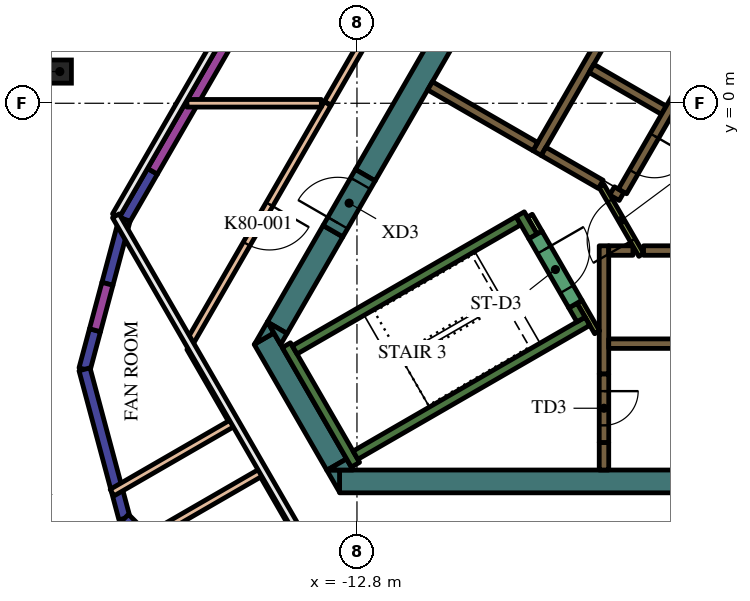
"""IFC4 building model, lengths in metres.
Left out: names, types, materials, properties, quantities, classifications, styles, units other than length and angle.
Written with IfcOpenShell. Run it as: python <this file> out.ifc"""

import sys

from ifc_helpers import new_model, si_unit, direction, frame, frame_2d, origin, origin_2d, place, context, subcontext, project, spatial, polyline, rectangle, hollow_circle, outline, extrude, element, fill, save


model = new_model("IFC4")
c1 = context("Model", 3, precision=1e-05, world=origin(), true_north=direction((0.0, 1.0)))
c2 = subcontext(c1, "Body", "Model", "MODEL_VIEW")
j1 = project(units=[si_unit("LENGTHUNIT", "METRE"), si_unit("PLANEANGLEUNIT", "RADIAN")], contexts=[c1])
p1 = place(None, origin())
s1 = spatial("IfcSite", under=j1, at=p1, CompositionType="ELEMENT")
p2 = place(p1, origin())
s2 = spatial("IfcBuilding", under=s1, at=p2, CompositionType="ELEMENT")
p3 = place(p2, frame((0.0, 0.0, 344.4)))
s3 = spatial("IfcBuildingStorey", under=s2, at=p3, CompositionType="ELEMENT", Elevation=344.4)
p4 = place(p3, frame((-20.619, 0.834, 0.0), z_axis=(0.0, 0.0, 1.0), x_axis=(1.0, 0.0, 0.0)))
e1 = element("IfcColumn", 1, at=p4, inside=s3, PredefinedType="COLUMN", context=c2, shape_type="SweptSolid", body=[
    extrude(hollow_circle(Radius=0.305, WallThickness=0.025, at=origin_2d()), origin(), (0.0, 0.0, 1.0), 4.2),
])
p5 = place(p3, frame((8.904, -9.95, 0.0), z_axis=(0.0, 0.0, 1.0), x_axis=(-1.0, 0.0, 0.0)))
e2 = element("IfcWall", 2, at=p5, inside=s3, PredefinedType="SOLIDWALL", context=c2, shape_type="SweptSolid", body=[
    extrude(rectangle(XDim=22.161, YDim=0.6, at=frame_2d((11.081, 0.0))), origin(), (0.0, 0.0, 1.0), 4.2),
])
p6 = place(p3, origin())
e3 = element("IfcWall", 3, at=p6, inside=s3, PredefinedType="SOLIDWALL", context=c2, shape_type="SweptSolid", body=[
    extrude(outline(polyline([(-13.597, -9.65), (-13.259, -9.65), (-13.259, -10.236), (-13.597, -9.65)])), origin(), (0.0, 0.0, 1.0), 4.2),
])
p7 = place(p3, frame((-13.333, -9.506, 0.0), z_axis=(0.0, 0.0, 1.0), x_axis=(-0.500019073792, 0.866014391245, 0.0)))
e4 = element("IfcWall", 4, at=p7, inside=s3, PredefinedType="SOLIDWALL", context=c2, shape_type="SweptSolid", body=[
    extrude(rectangle(XDim=3.823, YDim=0.6, at=frame_2d((1.912, 0.0))), origin(), (0.0, 0.0, 1.0), 4.2),
])
e5 = element("IfcWall", 5, at=p6, inside=s3, PredefinedType="SOLIDWALL", context=c2, shape_type="SweptSolid", body=[
    extrude(outline(polyline([(-14.987, -6.043), (-15.493, -6.335), (-15.156, -5.75), (-14.987, -6.043)])), origin(), (0.0, 0.0, 1.0), 4.2),
])
e6 = element("IfcWall", 6, at=p6, inside=s3, PredefinedType="SOLIDWALL", context=c2, shape_type="SweptSolid", body=[
    extrude(outline(polyline([(-12.904, -9.65), (-13.58, -9.65), (-13.073, -9.357), (-12.904, -9.65)])), origin(), (0.0, 0.0, 1.0), 4.2),
])
p8 = place(p3, frame((-13.432, -3.364, 0.0), z_axis=(0.0, 0.0, 1.0), x_axis=(-0.499960127962, -0.866048422692, 0.0)))
e7 = element("IfcWall", 7, at=p8, inside=s3, PredefinedType="SOLIDWALL", context=c2, shape_type="SweptSolid", body=[
    extrude(rectangle(XDim=2.934, YDim=0.6, at=frame_2d((1.467, 0.0))), origin(), (0.0, 0.0, 1.0), 4.2),
])
e8 = element("IfcWall", 8, at=p6, inside=s3, PredefinedType="SOLIDWALL", context=c2, shape_type="SweptSolid", body=[
    extrude(outline(polyline([(-14.809, -6.35), (-15.147, -5.764), (-14.64, -6.057), (-14.809, -6.35)])), origin(), (0.0, 0.0, 1.0), 4.2),
])
p9 = place(p3, frame((-4.652, 11.842, 0.0), z_axis=(0.0, 0.0, 1.0), x_axis=(-0.500003640647, -0.866023301845, 0.0)))
e9 = element("IfcWall", 9, at=p9, inside=s3, PredefinedType="SOLIDWALL", context=c2, shape_type="SweptSolid", body=[
    extrude(rectangle(XDim=15.858, YDim=0.6, at=frame_2d((7.929, 0.0))), origin(), (0.0, 0.0, 1.0), 4.2),
])
p10 = place(p3, frame((-12.84, -9.511, 0.0), z_axis=(0.0, 0.0, 1.0), x_axis=(-0.499997733992, 0.866026712061, 0.0)))
e10 = element("IfcWall", 10, at=p10, inside=s3, PredefinedType="SOLIDWALL", context=c2, shape_type="SweptSolid", body=[
    extrude(rectangle(XDim=3.634, YDim=0.25, at=frame_2d((1.817, 0.0))), origin(), (0.0, 0.0, 1.0), 4.2),
])
p11 = place(p3, frame((-14.44, -6.49, 0.0), z_axis=(0.0, 0.0, 1.0), x_axis=(0.866022966069, 0.500004222222, 0.0)))
e11 = element("IfcWall", 11, at=p11, inside=s3, PredefinedType="SOLIDWALL", context=c2, shape_type="SweptSolid", body=[
    extrude(rectangle(XDim=6.8, YDim=0.25, at=frame_2d((3.4, 0.0))), origin(), (0.0, 0.0, 1.0), 4.2),
])
p12 = place(p3, frame((-8.168, -3.503, 0.0), z_axis=(0.0, 0.0, 1.0), x_axis=(-0.499952099219, 0.866053057547, 0.0)))
e12 = element("IfcWall", 12, at=p12, inside=s3, PredefinedType="SOLIDWALL", context=c2, shape_type="SweptSolid", body=[
    extrude(rectangle(XDim=0.675, YDim=0.25, at=frame_2d((0.337, 0.0))), origin(), (0.0, 0.0, 1.0), 4.2),
])
p13 = place(p3, frame((-12.84, -9.261, 0.0), z_axis=(0.0, 0.0, 1.0), x_axis=(0.866016039709, 0.500016218704, 0.0)))
e13 = element("IfcWall", 13, at=p13, inside=s3, PredefinedType="SOLIDWALL", context=c2, shape_type="SweptSolid", body=[
    extrude(rectangle(XDim=7.05, YDim=0.25, at=frame_2d((3.525, 0.0))), origin(), (0.0, 0.0, 1.0), 4.2),
])
p14 = place(p3, frame((-6.905, -5.69, 0.0), z_axis=(0.0, 0.0, 1.0), x_axis=(-0.500402024738, 0.865793170242, 0.0)))
e14 = element("IfcWall", 14, at=p14, inside=s3, PredefinedType="SOLIDWALL", context=c2, shape_type="SweptSolid", body=[
    extrude(rectangle(XDim=0.425, YDim=0.25, at=frame_2d((0.212, 0.0))), origin(), (0.0, 0.0, 1.0), 4.2),
])
p15 = place(p3, frame((-5.259, -3.875, 0.0), z_axis=(0.0, 0.0, 1.0), x_axis=(1.0, 0.0, 0.0)))
e15 = element("IfcWall", 15, at=p15, inside=s3, PredefinedType="SOLIDWALL", context=c2, shape_type="SweptSolid", body=[
    extrude(rectangle(XDim=10.489, YDim=0.25, at=frame_2d((5.244, 0.0))), origin(), (0.0, 0.0, 1.0), 4.2),
])
p16 = place(p3, frame((-6.3, -7.125, 0.0), z_axis=(0.0, 0.0, 1.0), x_axis=(0.0, 1.0, 0.0)))
e16 = element("IfcWall", 16, at=p16, inside=s3, PredefinedType="SOLIDWALL", context=c2, shape_type="SweptSolid", body=[
    extrude(rectangle(XDim=3.375, YDim=0.25, at=frame_2d((1.687, 0.0))), origin(), (0.0, 0.0, 1.0), 4.2),
])
p17 = place(p3, frame((-6.175, -3.875, 0.0), z_axis=(0.0, 0.0, 1.0), x_axis=(1.0, 0.0, 0.0)))
e17 = element("IfcWall", 17, at=p17, inside=s3, PredefinedType="SOLIDWALL", context=c2, shape_type="SweptSolid", body=[
    extrude(rectangle(XDim=0.637, YDim=0.25, at=frame_2d((0.318, 0.0))), origin(), (0.0, 0.0, 1.0), 4.2),
])
p18 = place(p3, frame((-6.3, -8.925, 0.0), z_axis=(0.0, 0.0, 1.0), x_axis=(0.0, -1.0, 0.0)))
e18 = element("IfcWall", 18, at=p18, inside=s3, PredefinedType="SOLIDWALL", context=c2, shape_type="SweptSolid", body=[
    extrude(rectangle(XDim=0.725, YDim=0.25, at=frame_2d((0.363, 0.0))), origin(), (0.0, 0.0, 1.0), 4.2),
])
p19 = place(p3, frame((-8.06, -1.311, 0.0), z_axis=(0.0, 0.0, 1.0), x_axis=(0.50000273126, 0.866023826885, 0.0)))
e19 = element("IfcWall", 19, at=p19, inside=s3, PredefinedType="SOLIDWALL", context=c2, shape_type="SweptSolid", body=[
    extrude(rectangle(XDim=10.33, YDim=0.25, at=frame_2d((5.165, 0.0))), origin(), (0.0, 0.0, 1.0), 4.2),
])
p20 = place(p3, frame((-4.724, -0.182, 0.0), z_axis=(0.0, 0.0, 1.0), x_axis=(-0.866008176907, 0.50002983664, 0.0)))
e20 = element("IfcWall", 20, at=p20, inside=s3, PredefinedType="SOLIDWALL", context=c2, shape_type="SweptSolid", body=[
    extrude(rectangle(XDim=2.2, YDim=0.25, at=frame_2d((1.1, 0.0))), origin(), (0.0, 0.0, 1.0), 4.2),
])
p21 = place(p3, frame((-6.088, -2.305, 0.0), z_axis=(0.0, 0.0, 1.0), x_axis=(0.866059450854, -0.499941024108, 0.0)))
e21 = element("IfcWall", 21, at=p21, inside=s3, PredefinedType="SOLIDWALL", context=c2, shape_type="SweptSolid", body=[
    extrude(rectangle(XDim=0.29, YDim=0.25, at=frame_2d((0.145, 0.0))), origin(), (0.0, 0.0, 1.0), 4.2),
])
p22 = place(p3, frame((-7.889, -1.265, 0.0), z_axis=(0.0, 0.0, 1.0), x_axis=(0.865986741702, -0.500066958712, 0.0)))
e22 = element("IfcWall", 22, at=p22, inside=s3, PredefinedType="SOLIDWALL", context=c2, shape_type="SweptSolid", body=[
    extrude(rectangle(XDim=1.738, YDim=0.25, at=frame_2d((0.869, 0.0))), origin(), (0.0, 0.0, 1.0), 4.2),
])
p23 = place(p3, frame((-8.106, -1.14, 0.0), z_axis=(0.0, 0.0, 1.0), x_axis=(-0.866008981251, 0.500028443584, 0.0)))
e23 = element("IfcWall", 23, at=p23, inside=s3, PredefinedType="SOLIDWALL", context=c2, shape_type="SweptSolid", body=[
    extrude(rectangle(XDim=3.2, YDim=0.25, at=frame_2d((1.6, 0.0))), origin(), (0.0, 0.0, 1.0), 4.2),
])
p24 = place(p3, frame((-8.252, -2.958, 0.0), z_axis=(0.0, 0.0, 1.0), x_axis=(0.500174715838, -0.865924508047, 0.0)))
e24 = element("IfcWall", 24, at=p24, inside=s3, PredefinedType="PARTITIONING", context=c2, shape_type="SweptSolid", body=[
    extrude(rectangle(XDim=0.514, YDim=0.15, at=frame_2d((0.257, 0.0))), origin(), (0.0, 0.0, 1.0), 3.3),
])
p25 = place(p3, frame((-6.48, -6.027, 0.0), z_axis=(0.0, 0.0, 1.0), x_axis=(-0.499927229454, 0.866067413802, 0.0)))
e25 = element("IfcWall", 25, at=p25, inside=s3, PredefinedType="PARTITIONING", context=c2, shape_type="SweptSolid", body=[
    extrude(rectangle(XDim=0.929, YDim=0.15, at=frame_2d((0.464, 0.0))), origin(), (0.0, 0.0, 1.0), 4.2),
])
p26 = place(p3, frame((-6.175, -6.325, 0.0), z_axis=(0.0, 0.0, 1.0), x_axis=(1.0, 0.0, 0.0)))
e26 = element("IfcWall", 26, at=p26, inside=s3, PredefinedType="SOLIDWALL", context=c2, shape_type="SweptSolid", body=[
    extrude(rectangle(XDim=12.35, YDim=0.25, at=frame_2d((6.175, 0.0))), origin(), (0.0, 0.0, 1.0), 4.2),
])
p27 = place(p26, frame((3.205, 0.0, 0.0)))
e27 = element("IfcOpeningElement", 27, at=p27, cuts=e26, PredefinedType="OPENING", context=c2, shape_type="SweptSolid", body=[
    extrude(rectangle(XDim=0.9, YDim=2.1, at=frame_2d((0.45, 1.05))), frame((0.0, 0.135, 0.0), z_axis=(0.0, -1.0, 0.0), x_axis=(1.0, 0.0, 0.0)), (0.0, 0.0, 1.0), 0.27),
])
p28 = place(p26, frame((8.145, 0.0, 0.0)))
e28 = element("IfcOpeningElement", 28, at=p28, cuts=e26, PredefinedType="OPENING", context=c2, shape_type="SweptSolid", body=[
    extrude(rectangle(XDim=1.1, YDim=2.1, at=frame_2d((0.55, 1.05))), frame((0.0, 0.135, 0.0), z_axis=(0.0, -1.0, 0.0), x_axis=(1.0, 0.0, 0.0)), (0.0, 0.0, 1.0), 0.27),
])
p29 = place(p26, frame((10.665, 0.0, 0.0)))
e29 = element("IfcOpeningElement", 29, at=p29, cuts=e26, PredefinedType="OPENING", context=c2, shape_type="SweptSolid", body=[
    extrude(rectangle(XDim=1.1, YDim=2.1, at=frame_2d((0.55, 1.05))), frame((0.0, 0.135, 0.0), z_axis=(0.0, -1.0, 0.0), x_axis=(1.0, 0.0, 0.0)), (0.0, 0.0, 1.0), 0.27),
])
p30 = place(p3, frame((-0.898, 6.194, 0.0), z_axis=(0.0, 0.0, 1.0), x_axis=(-0.499996202215, -0.866027596426, 0.0)))
e30 = element("IfcWall", 30, at=p30, inside=s3, PredefinedType="SOLIDWALL", context=c2, shape_type="SweptSolid", body=[
    extrude(rectangle(XDim=9.83, YDim=0.25, at=frame_2d((4.915, 0.0))), origin(), (0.0, 0.0, 1.0), 4.2),
])
p31 = place(p30, frame((0.585, 0.0, 0.0)))
e31 = element("IfcOpeningElement", 31, at=p31, cuts=e30, PredefinedType="OPENING", context=c2, shape_type="SweptSolid", body=[
    extrude(rectangle(XDim=1.1, YDim=2.1, at=frame_2d((0.55, 1.05))), frame((0.0, 0.135, 0.0), z_axis=(0.0, -1.0, 0.0), x_axis=(1.0, 0.0, 0.0)), (0.0, 0.0, 1.0), 0.27),
])
p32 = place(p30, frame((3.105, 0.0, 0.0)))
e32 = element("IfcOpeningElement", 32, at=p32, cuts=e30, PredefinedType="OPENING", context=c2, shape_type="SweptSolid", body=[
    extrude(rectangle(XDim=1.1, YDim=2.1, at=frame_2d((0.55, 1.05))), frame((0.0, 0.135, 0.0), z_axis=(0.0, -1.0, 0.0), x_axis=(1.0, 0.0, 0.0)), (0.0, 0.0, 1.0), 0.27),
])
p33 = place(p30, frame((5.625, 0.0, 0.0)))
e33 = element("IfcOpeningElement", 33, at=p33, cuts=e30, PredefinedType="OPENING", context=c2, shape_type="SweptSolid", body=[
    extrude(rectangle(XDim=1.1, YDim=2.1, at=frame_2d((0.55, 1.05))), frame((0.0, 0.135, 0.0), z_axis=(0.0, -1.0, 0.0), x_axis=(1.0, 0.0, 0.0)), (0.0, 0.0, 1.0), 0.27),
])
p34 = place(p30, frame((8.145, 0.0, 0.0)))
e34 = element("IfcOpeningElement", 34, at=p34, cuts=e30, PredefinedType="OPENING", context=c2, shape_type="SweptSolid", body=[
    extrude(rectangle(XDim=1.1, YDim=2.1, at=frame_2d((0.55, 1.05))), frame((0.0, 0.135, 0.0), z_axis=(0.0, -1.0, 0.0), x_axis=(1.0, 0.0, 0.0)), (0.0, 0.0, 1.0), 0.27),
])
p35 = place(p3, frame((-8.103, -3.466, 0.0), z_axis=(0.0, 0.0, 1.0), x_axis=(0.500078061341, -0.865980330357, 0.0)))
e35 = element("IfcWall", 35, at=p35, inside=s3, PredefinedType="SOLIDWALL", context=c2, shape_type="SweptSolid", body=[
    extrude(rectangle(XDim=2.1, YDim=0.4, at=frame_2d((1.05, 0.0))), origin(), (0.0, 0.0, 1.0), 4.2),
])
p36 = place(p35, frame((0.45, 0.0, 0.0)))
e36 = element("IfcOpeningElement", 36, at=p36, cuts=e35, PredefinedType="OPENING", context=c2, shape_type="SweptSolid", body=[
    extrude(rectangle(XDim=1.2, YDim=2.1, at=frame_2d((0.6, 1.05))), frame((0.0, 0.21, 0.0), z_axis=(0.0, -1.0, 0.0), x_axis=(1.0, 0.0, 0.0)), (0.0, 0.0, 1.0), 0.42),
])
p37 = place(p3, frame((-6.3, -7.125, 0.0), z_axis=(0.0, 0.0, 1.0), x_axis=(0.0, -1.0, 0.0)))
e37 = element("IfcWall", 37, at=p37, inside=s3, PredefinedType="SOLIDWALL", context=c2, shape_type="SweptSolid", body=[
    extrude(rectangle(XDim=1.8, YDim=0.25, at=frame_2d((0.9, 0.0))), origin(), (0.0, 0.0, 1.0), 4.2),
])
p38 = place(p37, frame((0.45, 0.0, 0.0)))
e38 = element("IfcOpeningElement", 38, at=p38, cuts=e37, PredefinedType="OPENING", context=c2, shape_type="SweptSolid", body=[
    extrude(rectangle(XDim=0.9, YDim=2.1, at=frame_2d((0.45, 1.05))), frame((0.0, 0.135, 0.0), z_axis=(0.0, -1.0, 0.0), x_axis=(1.0, 0.0, 0.0)), (0.0, 0.0, 1.0), 0.27),
])
p39 = place(p3, frame((-5.317, -3.99, 0.0), z_axis=(0.0, 0.0, 1.0), x_axis=(-0.500027713859, 0.866009402589, 0.0)))
e39 = element("IfcWall", 39, at=p39, inside=s3, PredefinedType="PARTITIONING", context=c2, shape_type="SweptSolid", body=[
    extrude(rectangle(XDim=2.1, YDim=0.15, at=frame_2d((1.05, 0.0))), origin(), (0.0, 0.0, 1.0), 4.2),
])
p40 = place(p39, frame((0.45, 0.0, 0.0)))
e40 = element("IfcOpeningElement", 40, at=p40, cuts=e39, PredefinedType="OPENING", context=c2, shape_type="SweptSolid", body=[
    extrude(rectangle(XDim=1.2, YDim=2.1, at=frame_2d((0.6, 1.05))), frame((0.0, 0.085, 0.0), z_axis=(0.0, -1.0, 0.0), x_axis=(1.0, 0.0, 0.0)), (0.0, 0.0, 1.0), 0.17),
])
p41 = place(p3, frame((-13.432, -3.364, 0.0), z_axis=(0.0, 0.0, 1.0), x_axis=(0.500000056704, 0.866025371046, 0.0)))
e41 = element("IfcWall", 41, at=p41, inside=s3, PredefinedType="SOLIDWALL", context=c2, shape_type="SweptSolid", body=[
    extrude(rectangle(XDim=1.7, YDim=0.6, at=frame_2d((0.85, 0.0))), origin(), (0.0, 0.0, 1.0), 4.2),
])
p42 = place(p41, frame((0.25, 0.0, 0.0)))
e42 = element("IfcOpeningElement", 42, at=p42, cuts=e41, PredefinedType="OPENING", context=c2, shape_type="SweptSolid", body=[
    extrude(rectangle(XDim=1.2, YDim=2.1, at=frame_2d((0.6, 1.05))), frame((0.0, 0.31, 0.0), z_axis=(0.0, -1.0, 0.0), x_axis=(1.0, 0.0, 0.0)), (0.0, 0.0, 1.0), 0.62),
])
p43 = place(p3, frame((-3.118, 18.1, 0.0), z_axis=(0.0, 0.0, 1.0), x_axis=(-0.499998496574, -0.866026271786, 0.0)))
e43 = element("IfcWall", 43, at=p43, inside=s3, PredefinedType="PARTITIONING", context=c2, shape_type="SweptSolid", body=[
    extrude(rectangle(XDim=20.9, YDim=0.2, at=frame_2d((10.45, 0.0))), origin(), (0.0, 0.0, 1.0), 3.3),
])
p44 = place(p43, frame((9.65, 0.0, 0.0)))
e44 = element("IfcOpeningElement", 44, at=p44, cuts=e43, PredefinedType="OPENING", context=c2, shape_type="SweptSolid", body=[
    extrude(rectangle(XDim=1.6, YDim=2.1, at=frame_2d((0.8, 1.05))), frame((0.0, 0.11, 0.0), z_axis=(0.0, -1.0, 0.0), x_axis=(1.0, 0.0, 0.0)), (0.0, 0.0, 1.0), 0.22),
])
p45 = place(p3, frame((-13.573, -0.009, 0.0), z_axis=(0.0, 0.0, 1.0), x_axis=(-0.50000817069, -0.866020686383, 0.0)))
e45 = element("IfcWall", 45, at=p45, inside=s3, PredefinedType="PARTITIONING", context=c2, shape_type="SweptSolid", body=[
    extrude(rectangle(XDim=7.323, YDim=0.2, at=frame_2d((3.661, 0.0))), origin(), (0.0, 0.0, 1.0), 3.3),
])
p46 = place(p45, frame((3.061, 0.0, 0.0)))
e46 = element("IfcOpeningElement", 46, at=p46, cuts=e45, PredefinedType="OPENING", context=c2, shape_type="SweptSolid", body=[
    extrude(rectangle(XDim=1.2, YDim=2.1, at=frame_2d((0.6, 1.05))), frame((0.0, 0.11, 0.0), z_axis=(0.0, -1.0, 0.0), x_axis=(1.0, 0.0, 0.0)), (0.0, 0.0, 1.0), 0.22),
])
p47 = place(p3, frame((-17.274, 0.0, 0.0), z_axis=(0.0, 0.0, 1.0), x_axis=(1.0, 0.0, 0.0)))
e47 = element("IfcWall", 47, at=p47, inside=s3, PredefinedType="PARTITIONING", context=c2, shape_type="SweptSolid", body=[
    extrude(rectangle(XDim=3.536, YDim=0.2, at=frame_2d((1.768, 0.0))), origin(), (0.0, 0.0, 1.0), 3.3),
])
for number, where, z_axis, x_axis in (
    (48, (-19.244, -10.245, 0.0), (0.0, 0.0, 1.0), (0.866, 0.5, 0.0)),
    (49, (-15.3, -9.699, 0.0), (0.0, 0.0, 1.0), (-0.866, -0.5, 0.0)),
):
    element("IfcWall", number, at=place(p3, frame(where, z_axis=z_axis, x_axis=x_axis)), inside=s3, PredefinedType="PARTITIONING", context=c2, shape_type="SweptSolid", body=[
        extrude(rectangle(XDim=3.688, YDim=0.2, at=frame_2d((1.844, 0.0))), origin(), (0.0, 0.0, 1.0), 3.3),
    ])
for number, where, z_axis, x_axis in (
    (50, (-16.1, -8.314, 0.0), (0.0, 0.0, 1.0), (-0.5, 0.866, 0.0)),
    (51, (-14.161, -11.672, 0.0), (0.0, 0.0, 1.0), (-0.5, 0.866, 0.0)),
):
    element("IfcWall", number, at=place(p3, frame(where, z_axis=z_axis, x_axis=x_axis)), inside=s3, PredefinedType="PARTITIONING", context=c2, shape_type="SweptSolid", body=[
        extrude(rectangle(XDim=2.178, YDim=0.2, at=frame_2d((1.089, 0.0))), origin(), (0.0, 0.0, 1.0), 3.3),
    ])
p48 = place(p3, frame((-7.54, 16.64, 0.0), z_axis=(0.0, 0.0, 1.0), x_axis=(-0.500002158106, -0.866024157798, 0.0)))
e52 = element("IfcWall", 52, at=p48, inside=s3, PredefinedType="SOLIDWALL", context=c2, shape_type="SweptSolid", body=[
    extrude(rectangle(XDim=21.282, YDim=0.3, at=frame_2d((10.641, 0.0))), origin(), (0.0, 0.0, 1.0), 3.3),
])
p49 = place(p3, frame((-18.181, -1.79, 0.0), z_axis=(0.0, 0.0, 1.0), x_axis=(-0.500049712553, -0.865996700326, 0.0)))
e53 = element("IfcWall", 53, at=p49, inside=s3, PredefinedType="SOLIDWALL", context=c2, shape_type="SweptSolid", body=[
    extrude(rectangle(XDim=1.464, YDim=0.3, at=frame_2d((0.732, 0.0))), origin(), (0.0, 0.0, 1.0), 3.8),
])
p50 = place(p3, frame((-18.913, -3.058, 0.0), z_axis=(0.0, 0.0, 1.0), x_axis=(-0.258824282894, -0.965924422812, 0.0)))
e54 = element("IfcWall", 54, at=p50, inside=s3, PredefinedType="SOLIDWALL", context=c2, shape_type="SweptSolid", body=[
    extrude(rectangle(XDim=1.753, YDim=0.3, at=frame_2d((0.876, 0.0))), origin(), (0.0, 0.0, 1.0), 3.8),
])
p51 = place(p3, frame((-19.366, -4.751, 0.0), z_axis=(0.0, 0.0, 1.0), x_axis=(-0.258816538161, -0.965926498018, 0.0)))
e55 = element("IfcWall", 55, at=p51, inside=s3, PredefinedType="SOLIDWALL", context=c2, shape_type="SweptSolid", body=[
    extrude(rectangle(XDim=1.264, YDim=0.3, at=frame_2d((0.632, 0.0))), origin(), (0.0, 0.0, 1.0), 3.3),
])
p52 = place(p3, frame((-19.694, -5.972, 0.0), z_axis=(0.0, 0.0, 1.0), x_axis=(-0.258690231517, -0.96596033258, 0.0)))
e56 = element("IfcWall", 56, at=p52, inside=s3, PredefinedType="SOLIDWALL", context=c2, shape_type="SweptSolid", body=[
    extrude(rectangle(XDim=1.064, YDim=0.3, at=frame_2d((0.532, 0.0))), origin(), (0.0, 0.0, 1.0), 3.8),
])
for number, where, z_axis, x_axis in (
    (57, (-19.969, -7.0, 0.0), (0.0, 0.0, 1.0), (0.259, -0.966, 0.0)),
    (58, (-18.918, -10.922, 0.0), (0.0, 0.0, 1.0), (0.707, -0.707, 0.0)),
):
    element("IfcWall", number, at=place(p3, frame(where, z_axis=z_axis, x_axis=x_axis)), inside=s3, PredefinedType="SOLIDWALL", context=c2, shape_type="SweptSolid", body=[
        extrude(rectangle(XDim=4.061, YDim=0.3, at=frame_2d((2.03, 0.0))), origin(), (0.0, 0.0, 1.0), 3.8),
    ])
p53 = place(p34, origin())
e59 = element("IfcDoor", 59, at=p53, inside=s3, OperationType="DOUBLE_DOOR_SLIDING", PredefinedType="DOOR", context=c2, shape_type="SweptSolid", body=[
    extrude(rectangle(XDim=1.1, YDim=2.1, at=frame_2d((0.55, 1.05))), frame((0.0, 0.025, 0.0), z_axis=(0.0, -1.0, 0.0), x_axis=(1.0, 0.0, 0.0)), (0.0, 0.0, 1.0), 0.05),
])
fill(e34, e59)
p54 = place(p36, origin())
e60 = element("IfcDoor", 60, at=p54, inside=s3, OperationType="SINGLE_SWING_LEFT", PredefinedType="DOOR", context=c2, shape_type="SweptSolid", body=[
    extrude(rectangle(XDim=1.2, YDim=2.1, at=frame_2d((0.6, 1.05))), frame((0.0, 0.025, 0.0), z_axis=(0.0, -1.0, 0.0), x_axis=(1.0, 0.0, 0.0)), (0.0, 0.0, 1.0), 0.05),
])
fill(e36, e60)
p55 = place(p38, origin())
e61 = element("IfcDoor", 61, at=p55, inside=s3, OperationType="SINGLE_SWING_LEFT", PredefinedType="DOOR", context=c2, shape_type="SweptSolid", body=[
    extrude(rectangle(XDim=0.9, YDim=2.1, at=frame_2d((0.45, 1.05))), frame((0.0, 0.025, 0.0), z_axis=(0.0, -1.0, 0.0), x_axis=(1.0, 0.0, 0.0)), (0.0, 0.0, 1.0), 0.05),
])
fill(e38, e61)
p56 = place(p40, origin())
e62 = element("IfcDoor", 62, at=p56, inside=s3, OperationType="SINGLE_SWING_LEFT", PredefinedType="DOOR", context=c2, shape_type="SweptSolid", body=[
    extrude(rectangle(XDim=1.2, YDim=2.1, at=frame_2d((0.6, 1.05))), frame((0.0, 0.025, 0.0), z_axis=(0.0, -1.0, 0.0), x_axis=(1.0, 0.0, 0.0)), (0.0, 0.0, 1.0), 0.05),
])
fill(e40, e62)
p57 = place(p42, origin())
e63 = element("IfcDoor", 63, at=p57, inside=s3, OperationType="SINGLE_SWING_LEFT", PredefinedType="DOOR", context=c2, shape_type="SweptSolid", body=[
    extrude(rectangle(XDim=1.2, YDim=2.1, at=frame_2d((0.6, 1.05))), frame((0.0, 0.025, 0.0), z_axis=(0.0, -1.0, 0.0), x_axis=(1.0, 0.0, 0.0)), (0.0, 0.0, 1.0), 0.05),
])
fill(e42, e63)
p58 = place(p46, origin())
e64 = element("IfcDoor", 64, at=p58, inside=s3, OperationType="SINGLE_SWING_RIGHT", PredefinedType="DOOR", context=c2, shape_type="SweptSolid", body=[
    extrude(rectangle(XDim=1.2, YDim=2.1, at=frame_2d((0.6, 1.05))), frame((0.0, 0.025, 0.0), z_axis=(0.0, -1.0, 0.0), x_axis=(1.0, 0.0, 0.0)), (0.0, 0.0, 1.0), 0.05),
])
fill(e46, e64)
p59 = place(p2, frame((0.0, 0.0, 348.6)))
p60 = place(p59, origin())
p61 = place(p60, frame((-10.695, -6.175, 0.0)))
p62 = place(p61, frame((0.0, 0.0, 1.15)))
e65 = element("IfcWindow", 65, at=p62, inside=s3, PartitioningType="SINGLE_PANEL", PredefinedType="WINDOW", context=c2, shape_type="SweptSolid", body=[
    extrude(rectangle(XDim=7.364, YDim=5.955, at=origin_2d()), origin(), (0.0, 0.0, 1.0), 0.05),
])
save(model, sys.argv[1])
